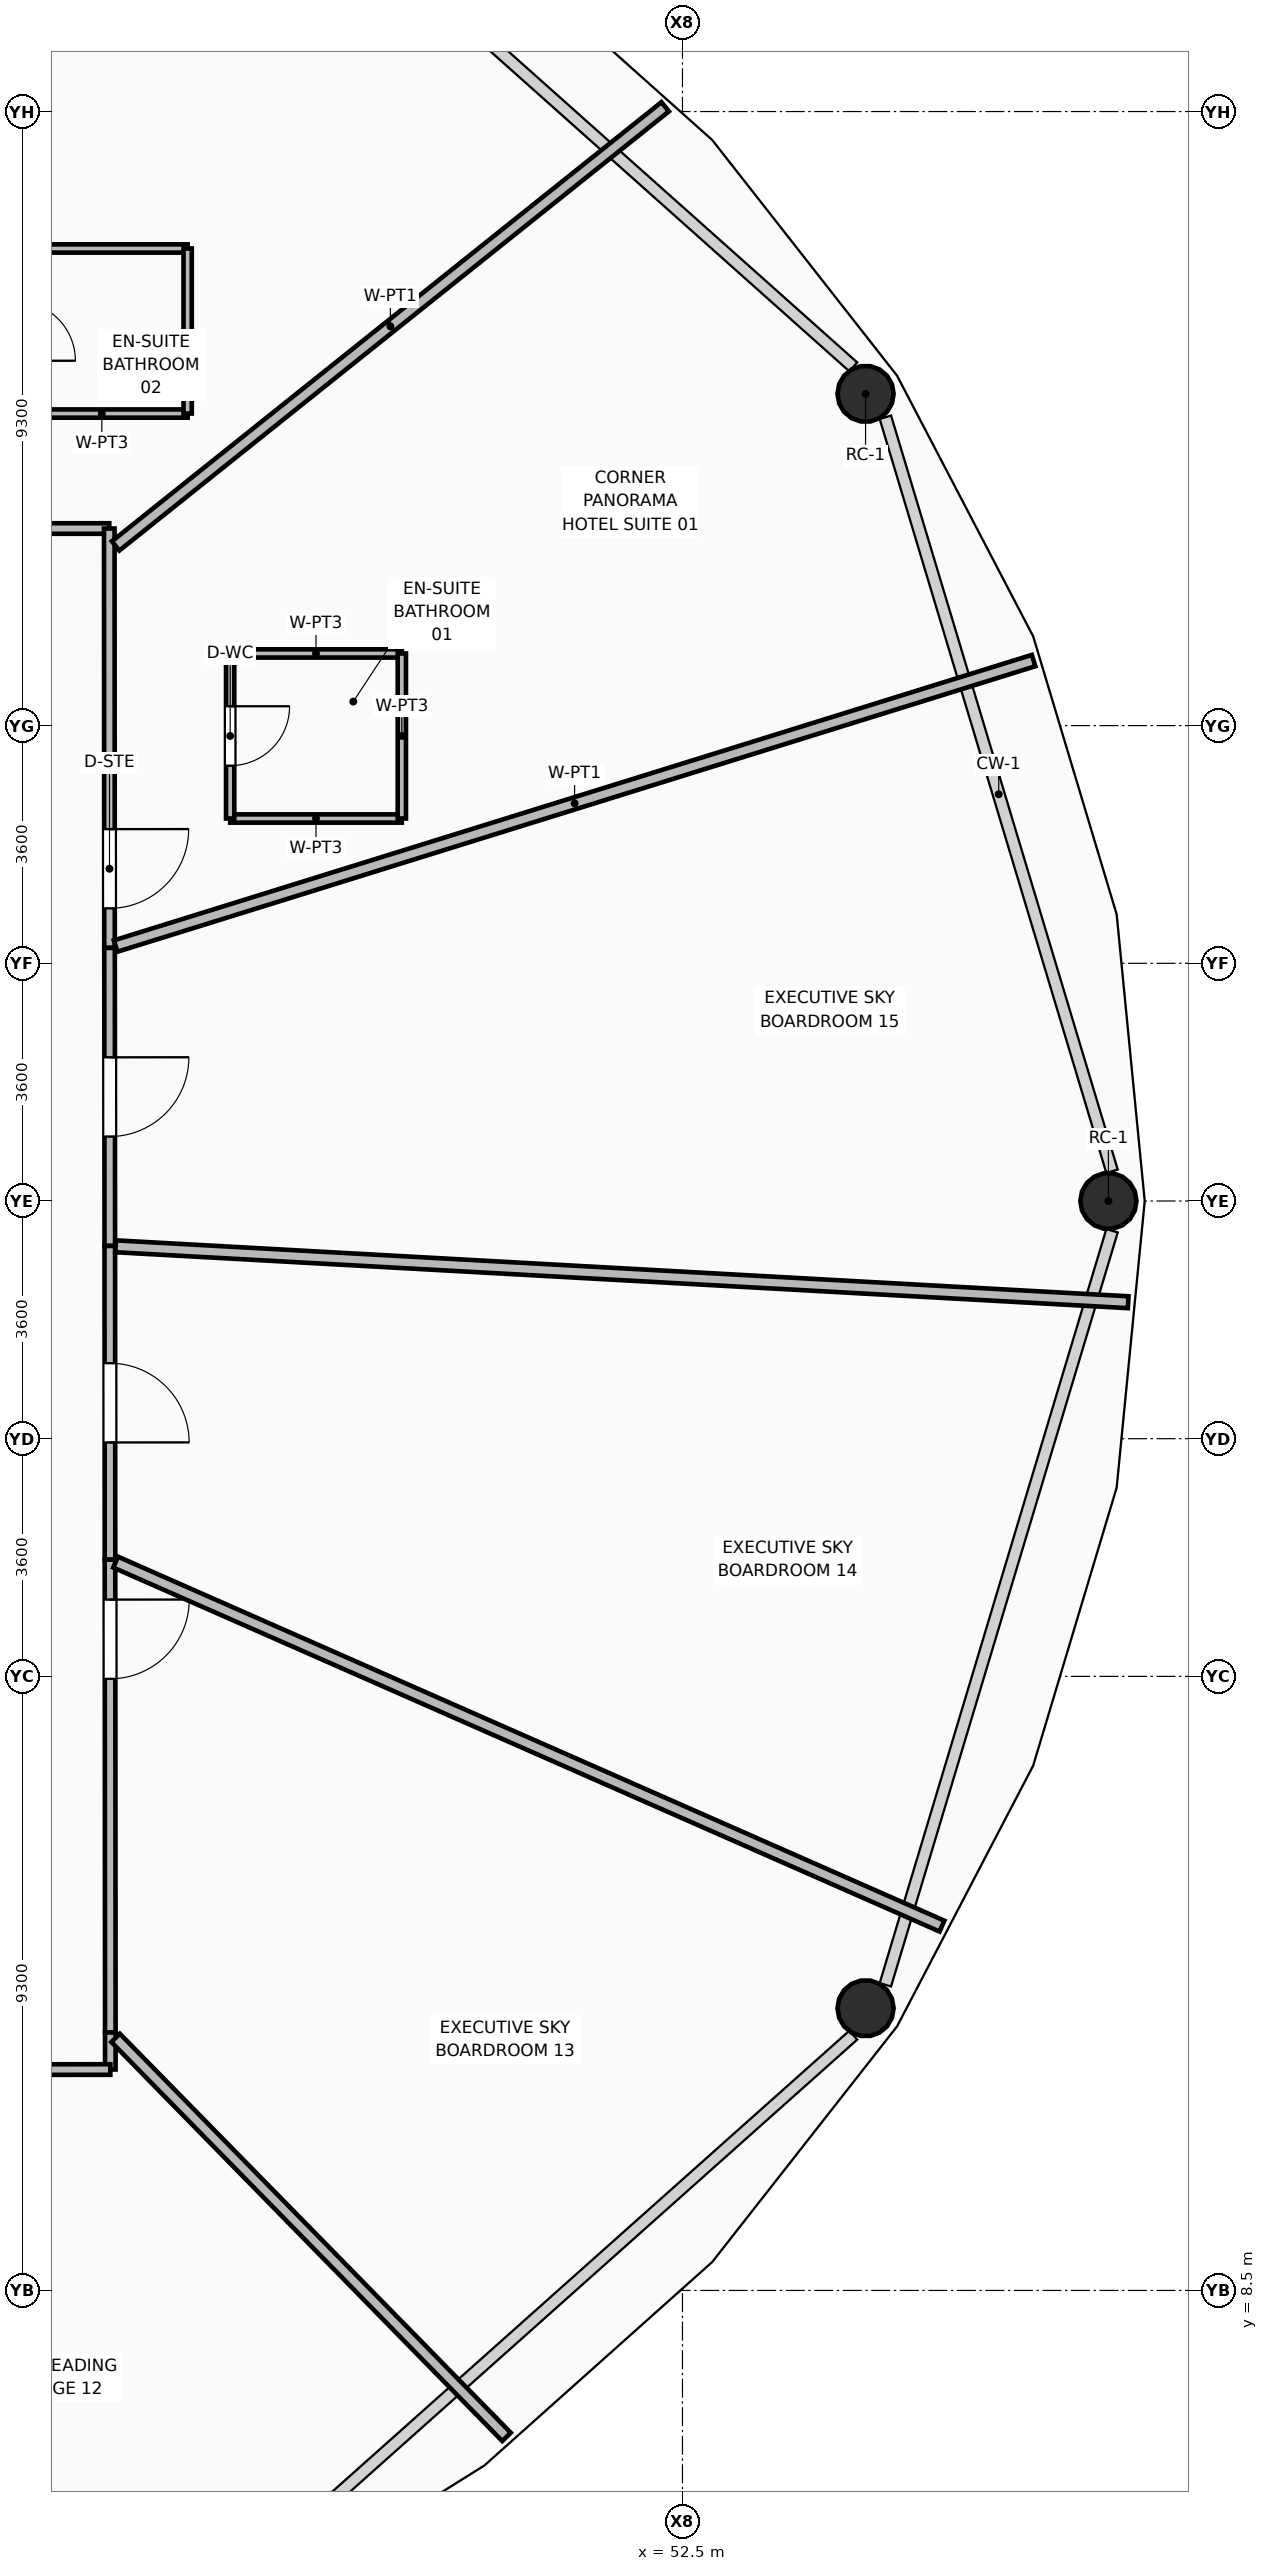
"""IFC4 building model, lengths in metres.
Left out: names, types, materials, properties, quantities, classifications, styles, units other than length and angle.
Written with IfcOpenShell. Run it as: python <this file> out.ifc"""

import sys

from ifc_helpers import new_model, si_unit, direction, frame, frame_2d, origin, origin_2d, place, context, subcontext, project, spatial, rectangle, hollow_circle, extrude, element, fill, save


model = new_model("IFC4")
c1 = context("Model", 3, precision=1e-05, world=origin(), true_north=direction((0.0, 1.0)))
c2 = subcontext(c1, "Body", "Model", "MODEL_VIEW")
j1 = project(units=[si_unit("LENGTHUNIT", "METRE"), si_unit("PLANEANGLEUNIT", "RADIAN")], contexts=[c1])
p1 = place(None, origin())
s1 = spatial("IfcSite", under=j1, at=p1, CompositionType="ELEMENT")
p2 = place(p1, origin())
s2 = spatial("IfcBuilding", under=s1, at=p2, CompositionType="ELEMENT")
p3 = place(p2, frame((0.0, 0.0, 57.0)))
s3 = spatial("IfcBuildingStorey", under=s2, at=p3, CompositionType="ELEMENT", Elevation=57.0)
for number, where, z_axis, x_axis in (
    (1, (58.951, 25.0, 0.0), (0.0, 0.0, 1.0), (1.0, 0.0, 0.0)),
    (2, (55.273, 37.225, 0.0), (0.0, 0.0, 1.0), (1.0, 0.0, 0.0)),
    (3, (55.273, 12.774, 0.0), (0.0, 0.0, 1.0), (1.0, 0.0, 0.0)),
):
    element("IfcColumn", number, at=place(p3, frame(where, z_axis=z_axis, x_axis=x_axis)), inside=s3, PredefinedType="COLUMN", context=c2, shape_type="SweptSolid", body=[
        extrude(hollow_circle(Radius=0.425, WallThickness=0.04, at=origin_2d()), origin(), (0.0, 0.0, 1.0), 3.57),
    ])
p4 = place(p3, frame((37.0, 35.185, 0.0), z_axis=(0.0, 0.0, 1.0), x_axis=(1.0, 0.0, 0.0)))
e4 = element("IfcWall", 4, at=p4, inside=s3, PredefinedType="PARTITIONING", context=c2, shape_type="SweptSolid", body=[
    extrude(rectangle(XDim=6.819, YDim=0.16, at=frame_2d((3.41, 0.0))), origin(), (0.0, 0.0, 1.0), 2.928),
])
p5 = place(p4, frame((1.338, 0.0, 0.0)))
e5 = element("IfcOpeningElement", 5, at=p5, cuts=e4, PredefinedType="OPENING", context=c2, shape_type="SweptSolid", body=[
    extrude(rectangle(XDim=1.2, YDim=2.1, at=frame_2d((0.6, 1.05))), frame((0.0, 0.09, 0.0), z_axis=(0.0, -1.0, 0.0), x_axis=(1.0, 0.0, 0.0)), (0.0, 0.0, 1.0), 0.18),
])
p6 = place(p3, frame((43.819, 35.185, 0.0), z_axis=(0.0, 0.0, 1.0), x_axis=(0.000614958758, -0.999999810913, 0.0)))
e6 = element("IfcWall", 6, at=p6, inside=s3, PredefinedType="PARTITIONING", context=c2, shape_type="SweptSolid", body=[
    extrude(rectangle(XDim=6.352, YDim=0.16, at=frame_2d((3.176, 0.0))), origin(), (0.0, 0.0, 1.0), 2.928),
])
p7 = place(p6, frame((4.553, 0.0, 0.0)))
e7 = element("IfcOpeningElement", 7, at=p7, cuts=e6, PredefinedType="OPENING", context=c2, shape_type="SweptSolid", body=[
    extrude(rectangle(XDim=1.2, YDim=2.1, at=frame_2d((0.6, 1.05))), frame((0.0, 0.09, 0.0), z_axis=(0.0, -1.0, 0.0), x_axis=(1.0, 0.0, 0.0)), (0.0, 0.0, 1.0), 0.18),
])
p8 = place(p3, frame((43.823, 28.833, 0.0), z_axis=(0.0, 0.0, 1.0), x_axis=(0.000865379091, -0.999999625559, 0.0)))
e8 = element("IfcWall", 8, at=p8, inside=s3, PredefinedType="PARTITIONING", context=c2, shape_type="SweptSolid", body=[
    extrude(rectangle(XDim=4.514, YDim=0.16, at=frame_2d((2.257, 0.0))), origin(), (0.0, 0.0, 1.0), 3.55),
])
p9 = place(p8, frame((1.657, 0.0, 0.0)))
e9 = element("IfcOpeningElement", 9, at=p9, cuts=e8, PredefinedType="OPENING", context=c2, shape_type="SweptSolid", body=[
    extrude(rectangle(XDim=1.2, YDim=2.1, at=frame_2d((0.6, 1.05))), frame((0.0, 0.09, 0.0), z_axis=(0.0, -1.0, 0.0), x_axis=(1.0, 0.0, 0.0)), (0.0, 0.0, 1.0), 0.18),
])
p10 = place(p3, frame((43.827, 24.319, 0.0), z_axis=(0.0, 0.0, 1.0), x_axis=(0.00066803685, -0.999999776863, 0.0)))
e10 = element("IfcWall", 10, at=p10, inside=s3, PredefinedType="PARTITIONING", context=c2, shape_type="SweptSolid", body=[
    extrude(rectangle(XDim=4.751, YDim=0.16, at=frame_2d((2.375, 0.0))), origin(), (0.0, 0.0, 1.0), 2.928),
])
p11 = place(p10, frame((1.776, 0.0, 0.0)))
e11 = element("IfcOpeningElement", 11, at=p11, cuts=e10, PredefinedType="OPENING", context=c2, shape_type="SweptSolid", body=[
    extrude(rectangle(XDim=1.2, YDim=2.1, at=frame_2d((0.6, 1.05))), frame((0.0, 0.09, 0.0), z_axis=(0.0, -1.0, 0.0), x_axis=(1.0, 0.0, 0.0)), (0.0, 0.0, 1.0), 0.18),
])
p12 = place(p3, frame((43.83, 19.568, 0.0), z_axis=(0.0, 0.0, 1.0), x_axis=(0.000681849016, -0.999999767541, 0.0)))
e12 = element("IfcWall", 12, at=p12, inside=s3, PredefinedType="PARTITIONING", context=c2, shape_type="SweptSolid", body=[
    extrude(rectangle(XDim=7.161, YDim=0.16, at=frame_2d((3.581, 0.0))), origin(), (0.0, 0.0, 1.0), 2.928),
])
p13 = place(p12, frame((0.605, 0.0, 0.0)))
e13 = element("IfcOpeningElement", 13, at=p13, cuts=e12, PredefinedType="OPENING", context=c2, shape_type="SweptSolid", body=[
    extrude(rectangle(XDim=1.2, YDim=2.1, at=frame_2d((0.6, 1.05))), frame((0.0, 0.09, 0.0), z_axis=(0.0, -1.0, 0.0), x_axis=(1.0, 0.0, 0.0)), (0.0, 0.0, 1.0), 0.18),
])
p14 = place(p3, frame((43.835, 12.407, 0.0), z_axis=(0.0, 0.0, 1.0), x_axis=(0.0, -1.0, 0.0)))
e14 = element("IfcWall", 14, at=p14, inside=s3, PredefinedType="PARTITIONING", context=c2, shape_type="SweptSolid", body=[
    extrude(rectangle(XDim=0.561, YDim=0.16, at=frame_2d((0.281, 0.0))), origin(), (0.0, 0.0, 1.0), 3.55),
])
p15 = place(p3, frame((43.835, 11.846, 0.0), z_axis=(0.0, 0.0, 1.0), x_axis=(-0.999999777452, -0.000667155766, 0.0)))
e15 = element("IfcWall", 15, at=p15, inside=s3, PredefinedType="PARTITIONING", context=c2, shape_type="SweptSolid", body=[
    extrude(rectangle(XDim=7.319, YDim=0.16, at=frame_2d((3.659, 0.0))), origin(), (0.0, 0.0, 1.0), 2.928),
])
p16 = place(p15, frame((2.985, 0.0, 0.0)))
e16 = element("IfcOpeningElement", 16, at=p16, cuts=e15, PredefinedType="OPENING", context=c2, shape_type="SweptSolid", body=[
    extrude(rectangle(XDim=1.2, YDim=2.1, at=frame_2d((0.6, 1.05))), frame((0.0, 0.09, 0.0), z_axis=(0.0, -1.0, 0.0), x_axis=(1.0, 0.0, 0.0)), (0.0, 0.0, 1.0), 0.18),
])
p17 = place(p3, frame((43.915, 28.861, 0.0), z_axis=(0.0, 0.0, 1.0), x_axis=(0.954884570259, 0.296977200271, 0.0)))
e17 = element("IfcWall", 17, at=p17, inside=s3, PredefinedType="PARTITIONING", context=c2, shape_type="SweptSolid", body=[
    extrude(rectangle(XDim=14.56, YDim=0.18, at=frame_2d((7.28, 0.0))), origin(), (0.0, 0.0, 1.0), 2.775),
])
p18 = place(p3, frame((43.915, 34.921, 0.0), z_axis=(0.0, 0.0, 1.0), x_axis=(0.781201807071, 0.624278572938, 0.0)))
e18 = element("IfcWall", 18, at=p18, inside=s3, PredefinedType="PARTITIONING", context=c2, shape_type="SweptSolid", body=[
    extrude(rectangle(XDim=10.654, YDim=0.18, at=frame_2d((5.327, 0.0))), origin(), (0.0, 0.0, 1.0), 2.775),
])
p19 = place(p3, frame((37.043, 35.265, 0.0), z_axis=(0.0, 0.0, 1.0), x_axis=(0.475167084094, 0.879895585961, 0.0)))
e19 = element("IfcWall", 19, at=p19, inside=s3, PredefinedType="PARTITIONING", context=c2, shape_type="SweptSolid", body=[
    extrude(rectangle(XDim=13.732, YDim=0.18, at=frame_2d((6.866, 0.0))), origin(), (0.0, 0.0, 1.0), 2.775),
])
p20 = place(p3, frame((43.915, 12.325, 0.0), z_axis=(0.0, 0.0, 1.0), x_axis=(0.699796666029, -0.714342093268, 0.0)))
e20 = element("IfcWall", 20, at=p20, inside=s3, PredefinedType="PARTITIONING", context=c2, shape_type="SweptSolid", body=[
    extrude(rectangle(XDim=8.459, YDim=0.18, at=frame_2d((4.23, 0.0))), origin(), (0.0, 0.0, 1.0), 2.775),
])
p21 = place(p3, frame((43.915, 19.531, 0.0), z_axis=(0.0, 0.0, 1.0), x_axis=(0.915142788341, -0.403129851223, 0.0)))
e21 = element("IfcWall", 21, at=p21, inside=s3, PredefinedType="PARTITIONING", context=c2, shape_type="SweptSolid", body=[
    extrude(rectangle(XDim=13.675, YDim=0.18, at=frame_2d((6.838, 0.0))), origin(), (0.0, 0.0, 1.0), 2.775),
])
p22 = place(p3, frame((43.915, 24.314, 0.0), z_axis=(0.0, 0.0, 1.0), x_axis=(0.998478397393, -0.055144264799, 0.0)))
e22 = element("IfcWall", 22, at=p22, inside=s3, PredefinedType="PARTITIONING", context=c2, shape_type="SweptSolid", body=[
    extrude(rectangle(XDim=15.358, YDim=0.18, at=frame_2d((7.679, 0.0))), origin(), (0.0, 0.0, 1.0), 2.775),
])
for number, where, z_axis, x_axis in (
    (23, (45.65, 30.793, 0.0), (0.0, 0.0, 1.0), (1.0, 0.0, 0.0)),
    (24, (45.65, 33.293, 0.0), (0.0, 0.0, 1.0), (1.0, 0.0, 0.0)),
):
    element("IfcWall", number, at=place(p3, frame(where, z_axis=z_axis, x_axis=x_axis)), inside=s3, PredefinedType="PARTITIONING", context=c2, shape_type="SweptSolid", body=[
        extrude(rectangle(XDim=2.6, YDim=0.125, at=frame_2d((1.3, 0.0))), origin(), (0.0, 0.0, 1.0), 3.55),
    ])
p23 = place(p3, frame((45.65, 30.793, 0.0), z_axis=(0.0, 0.0, 1.0), x_axis=(0.0, 1.0, 0.0)))
e25 = element("IfcWall", 25, at=p23, inside=s3, PredefinedType="PARTITIONING", context=c2, shape_type="SweptSolid", body=[
    extrude(rectangle(XDim=2.5, YDim=0.125, at=frame_2d((1.25, 0.0))), origin(), (0.0, 0.0, 1.0), 3.55),
])
p24 = place(p23, frame((0.8, 0.0, 0.0)))
e26 = element("IfcOpeningElement", 26, at=p24, cuts=e25, PredefinedType="OPENING", context=c2, shape_type="SweptSolid", body=[
    extrude(rectangle(XDim=0.9, YDim=2.1, at=frame_2d((0.45, 1.05))), frame((0.0, 0.073, 0.0), z_axis=(0.0, -1.0, 0.0), x_axis=(1.0, 0.0, 0.0)), (0.0, 0.0, 1.0), 0.145),
])
p25 = place(p3, frame((48.25, 30.793, 0.0), z_axis=(0.0, 0.0, 1.0), x_axis=(0.0, 1.0, 0.0)))
e27 = element("IfcWall", 27, at=p25, inside=s3, PredefinedType="PARTITIONING", context=c2, shape_type="SweptSolid", body=[
    extrude(rectangle(XDim=2.5, YDim=0.125, at=frame_2d((1.25, 0.0))), origin(), (0.0, 0.0, 1.0), 3.55),
])
for number, where, z_axis, x_axis in (
    (28, (42.406, 36.926, 0.0), (0.0, 0.0, 1.0), (1.0, 0.0, 0.0)),
    (29, (42.406, 39.426, 0.0), (0.0, 0.0, 1.0), (1.0, 0.0, 0.0)),
):
    element("IfcWall", number, at=place(p3, frame(where, z_axis=z_axis, x_axis=x_axis)), inside=s3, PredefinedType="PARTITIONING", context=c2, shape_type="SweptSolid", body=[
        extrude(rectangle(XDim=2.6, YDim=0.125, at=frame_2d((1.3, 0.0))), origin(), (0.0, 0.0, 1.0), 2.928),
    ])
p26 = place(p3, frame((45.006, 36.926, 0.0), z_axis=(0.0, 0.0, 1.0), x_axis=(0.0, 1.0, 0.0)))
e30 = element("IfcWall", 30, at=p26, inside=s3, PredefinedType="PARTITIONING", context=c2, shape_type="SweptSolid", body=[
    extrude(rectangle(XDim=2.5, YDim=0.125, at=frame_2d((1.25, 0.0))), origin(), (0.0, 0.0, 1.0), 3.55),
])
p27 = place(p24, frame((0.9, 0.0, 0.0), z_axis=(0.0, 0.0, 1.0), x_axis=(-1.0, 0.0, 0.0)))
e31 = element("IfcDoor", 31, at=p27, inside=s3, OperationType="SINGLE_SWING_LEFT", PredefinedType="DOOR", context=c2, shape_type="SweptSolid", body=[
    extrude(rectangle(XDim=0.9, YDim=2.1, at=frame_2d((0.45, 1.05))), frame((0.0, 0.025, 0.0), z_axis=(0.0, -1.0, 0.0), x_axis=(1.0, 0.0, 0.0)), (0.0, 0.0, 1.0), 0.05),
])
fill(e26, e31)
p28 = place(p7, origin())
e32 = element("IfcDoor", 32, at=p28, inside=s3, OperationType="SINGLE_SWING_LEFT", PredefinedType="DOOR", context=c2, shape_type="SweptSolid", body=[
    extrude(rectangle(XDim=1.2, YDim=2.1, at=frame_2d((0.6, 1.05))), frame((0.0, 0.025, 0.0), z_axis=(0.0, -1.0, 0.0), x_axis=(1.0, 0.0, 0.0)), (0.0, 0.0, 1.0), 0.05),
])
fill(e7, e32)
p29 = place(p13, origin())
e33 = element("IfcDoor", 33, at=p29, inside=s3, OperationType="SINGLE_SWING_LEFT", PredefinedType="DOOR", context=c2, shape_type="SweptSolid", body=[
    extrude(rectangle(XDim=1.2, YDim=2.1, at=frame_2d((0.6, 1.05))), frame((0.0, 0.025, 0.0), z_axis=(0.0, -1.0, 0.0), x_axis=(1.0, 0.0, 0.0)), (0.0, 0.0, 1.0), 0.05),
])
fill(e13, e33)
p30 = place(p11, origin())
e34 = element("IfcDoor", 34, at=p30, inside=s3, OperationType="SINGLE_SWING_RIGHT", PredefinedType="DOOR", context=c2, shape_type="SweptSolid", body=[
    extrude(rectangle(XDim=1.2, YDim=2.1, at=frame_2d((0.6, 1.05))), frame((0.0, 0.025, 0.0), z_axis=(0.0, -1.0, 0.0), x_axis=(1.0, 0.0, 0.0)), (0.0, 0.0, 1.0), 0.05),
])
fill(e11, e34)
p31 = place(p9, origin())
e35 = element("IfcDoor", 35, at=p31, inside=s3, OperationType="SINGLE_SWING_LEFT", PredefinedType="DOOR", context=c2, shape_type="SweptSolid", body=[
    extrude(rectangle(XDim=1.2, YDim=2.1, at=frame_2d((0.6, 1.05))), frame((0.0, 0.025, 0.0), z_axis=(0.0, -1.0, 0.0), x_axis=(1.0, 0.0, 0.0)), (0.0, 0.0, 1.0), 0.05),
])
fill(e9, e35)
save(model, sys.argv[1])
